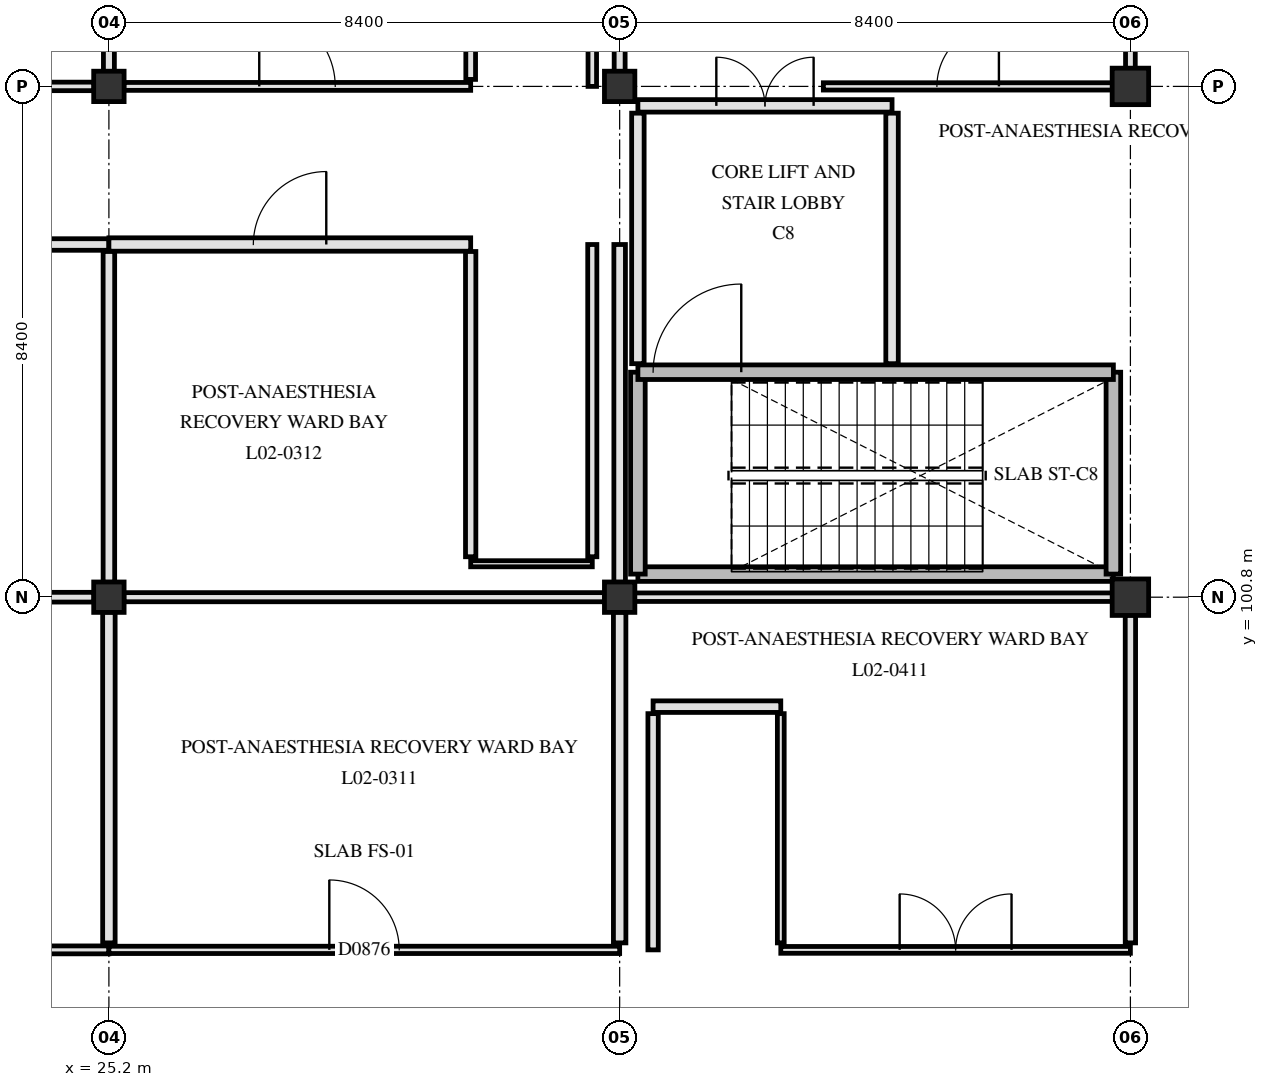
"""IFC4 building model, lengths in metres.
Left out: names, types, materials, properties, quantities, classifications, styles, units other than length and angle.
Written with IfcOpenShell. Run it as: python <this file> out.ifc"""

import sys

from ifc_helpers import new_model, si_unit, direction, frame, frame_2d, origin, origin_2d, place, context, subcontext, project, spatial, rectangle, extrude, element, fill, save


model = new_model("IFC4")
c1 = context("Model", 3, precision=1e-05, world=origin(), true_north=direction((0.0, 1.0)))
c2 = subcontext(c1, "Body", "Model", "MODEL_VIEW")
j1 = project(units=[si_unit("LENGTHUNIT", "METRE"), si_unit("PLANEANGLEUNIT", "RADIAN")], contexts=[c1])
p1 = place(None, origin())
s1 = spatial("IfcSite", under=j1, at=p1, CompositionType="ELEMENT")
p2 = place(p1, origin())
s2 = spatial("IfcBuilding", under=s1, at=p2, CompositionType="ELEMENT")
p3 = place(p2, frame((0.0, 0.0, 9.3)))
s3 = spatial("IfcBuildingStorey", under=s2, at=p3, CompositionType="ELEMENT", Elevation=9.3)
for number, where, z_axis, x_axis in (
    (1, (25.2, 100.8, 0.0), (0.0, 0.0, 1.0), (1.0, 0.0, 0.0)),
    (2, (25.2, 109.2, 0.0), (0.0, 0.0, 1.0), (1.0, 0.0, 0.0)),
    (3, (33.6, 100.8, 0.0), (0.0, 0.0, 1.0), (1.0, 0.0, 0.0)),
    (4, (33.6, 109.2, 0.0), (0.0, 0.0, 1.0), (1.0, 0.0, 0.0)),
):
    element("IfcColumn", number, at=place(p3, frame(where, z_axis=z_axis, x_axis=x_axis)), inside=s3, PredefinedType="COLUMN", context=c2, shape_type="SweptSolid", body=[
        extrude(rectangle(XDim=0.5, YDim=0.5, at=origin_2d()), origin(), (0.0, 0.0, 1.0), 5.1),
    ])
for number, where, z_axis, x_axis in (
    (5, (42.0, 100.8, 0.0), (0.0, 0.0, 1.0), (1.0, 0.0, 0.0)),
    (6, (42.0, 109.2, 0.0), (0.0, 0.0, 1.0), (1.0, 0.0, 0.0)),
):
    element("IfcColumn", number, at=place(p3, frame(where, z_axis=z_axis, x_axis=x_axis)), inside=s3, PredefinedType="COLUMN", context=c2, shape_type="SweptSolid", body=[
        extrude(rectangle(XDim=0.6, YDim=0.6, at=origin_2d()), origin(), (0.0, 0.0, 1.0), 5.1),
    ])
p4 = place(p3, frame((33.9, 101.18, 0.0), z_axis=(0.0, 0.0, 1.0), x_axis=(1.0, 0.0, 0.0)))
e7 = element("IfcWall", 7, at=p4, inside=s3, PredefinedType="SHEAR", context=c2, shape_type="SweptSolid", body=[
    extrude(rectangle(XDim=7.82, YDim=0.24, at=frame_2d((3.91, 0.0))), origin(), (0.0, 0.0, 1.0), 4.78),
])
for number, where, z_axis, x_axis in (
    (8, (33.9, 101.18, 0.0), (0.0, 0.0, 1.0), (0.0, 1.0, 0.0)),
    (9, (41.72, 101.18, 0.0), (0.0, 0.0, 1.0), (0.0, 1.0, 0.0)),
):
    element("IfcWall", number, at=place(p3, frame(where, z_axis=z_axis, x_axis=x_axis)), inside=s3, PredefinedType="SHEAR", context=c2, shape_type="SweptSolid", body=[
        extrude(rectangle(XDim=3.32, YDim=0.24, at=frame_2d((1.66, 0.0))), origin(), (0.0, 0.0, 1.0), 4.78),
    ])
p5 = place(p3, frame((33.9, 104.5, 0.0), z_axis=(0.0, 0.0, 1.0), x_axis=(1.0, 0.0, 0.0)))
e10 = element("IfcWall", 10, at=p5, inside=s3, PredefinedType="SHEAR", context=c2, shape_type="SweptSolid", body=[
    extrude(rectangle(XDim=7.82, YDim=0.24, at=frame_2d((3.91, 0.0))), origin(), (0.0, 0.0, 1.0), 4.78),
])
p6 = place(p5, frame((0.25, 0.0, 0.0)))
e11 = element("IfcOpeningElement", 11, at=p6, cuts=e10, PredefinedType="OPENING", context=c2, shape_type="SweptSolid", body=[
    extrude(rectangle(XDim=1.45, YDim=2.2, at=frame_2d((0.725, 1.1))), frame((0.0, 0.13, 0.0), z_axis=(0.0, -1.0, 0.0), x_axis=(1.0, 0.0, 0.0)), (0.0, 0.0, 1.0), 0.26),
])
p7 = place(p3, frame((38.08, 104.64, 0.0), z_axis=(0.0, 0.0, 1.0), x_axis=(0.0, 1.0, 0.0)))
e12 = element("IfcWall", 12, at=p7, inside=s3, PredefinedType="PARTITIONING", context=c2, shape_type="SweptSolid", body=[
    extrude(rectangle(XDim=4.12, YDim=0.205, at=frame_2d((2.06, 0.0))), origin(), (0.0, 0.0, 1.0), 4.77),
])
p8 = place(p3, frame((33.9, 104.64, 0.0), z_axis=(0.0, 0.0, 1.0), x_axis=(0.0, 1.0, 0.0)))
e13 = element("IfcWall", 13, at=p8, inside=s3, PredefinedType="PARTITIONING", context=c2, shape_type="SweptSolid", body=[
    extrude(rectangle(XDim=4.12, YDim=0.205, at=frame_2d((2.06, 0.0))), origin(), (0.0, 0.0, 1.0), 4.17),
])
p9 = place(p3, frame((33.9, 108.88, 0.0), z_axis=(0.0, 0.0, 1.0), x_axis=(1.0, 0.0, 0.0)))
e14 = element("IfcWall", 14, at=p9, inside=s3, PredefinedType="PARTITIONING", context=c2, shape_type="SweptSolid", body=[
    extrude(rectangle(XDim=4.18, YDim=0.205, at=frame_2d((2.09, 0.0))), origin(), (0.0, 0.0, 1.0), 4.02),
])
p10 = place(p9, frame((1.29, 0.0, 0.0)))
e15 = element("IfcOpeningElement", 15, at=p10, cuts=e14, PredefinedType="OPENING", context=c2, shape_type="SweptSolid", body=[
    extrude(rectangle(XDim=1.6, YDim=2.25, at=frame_2d((0.8, 1.125))), frame((0.0, 0.113, 0.0), z_axis=(0.0, -1.0, 0.0), x_axis=(1.0, 0.0, 0.0)), (0.0, 0.0, 1.0), 0.225),
])
p11 = place(p3, frame((16.8, 95.0, 0.0), z_axis=(0.0, 0.0, 1.0), x_axis=(1.0, 0.0, 0.0)))
e16 = element("IfcWall", 16, at=p11, inside=s3, PredefinedType="PARTITIONING", context=c2, shape_type="SweptSolid", body=[
    extrude(rectangle(XDim=8.4, YDim=0.13, at=frame_2d((4.2, 0.0))), origin(), (0.0, 0.0, 1.0), 4.17),
])
p12 = place(p11, frame((3.4, 0.0, 0.0)))
e17 = element("IfcOpeningElement", 17, at=p12, cuts=e16, PredefinedType="OPENING", context=c2, shape_type="SweptSolid", body=[
    extrude(rectangle(XDim=1.6, YDim=2.25, at=frame_2d((0.8, 1.125))), frame((0.0, 0.075, 0.0), z_axis=(0.0, -1.0, 0.0), x_axis=(1.0, 0.0, 0.0)), (0.0, 0.0, 1.0), 0.15),
])
p13 = place(p3, frame((25.2, 95.0, 0.0), z_axis=(0.0, 0.0, 1.0), x_axis=(1.0, 0.0, 0.0)))
e18 = element("IfcWall", 18, at=p13, inside=s3, PredefinedType="PARTITIONING", context=c2, shape_type="SweptSolid", body=[
    extrude(rectangle(XDim=8.4, YDim=0.12, at=frame_2d((4.2, 0.0))), origin(), (0.0, 0.0, 1.0), 4.17),
])
p14 = place(p13, frame((3.625, 0.0, 0.0)))
e19 = element("IfcOpeningElement", 19, at=p14, cuts=e18, PredefinedType="OPENING", context=c2, shape_type="SweptSolid", body=[
    extrude(rectangle(XDim=1.15, YDim=2.15, at=frame_2d((0.575, 1.075))), frame((0.0, 0.07, 0.0), z_axis=(0.0, -1.0, 0.0), x_axis=(1.0, 0.0, 0.0)), (0.0, 0.0, 1.0), 0.14),
])
p15 = place(p3, frame((36.25, 95.0, 0.0), z_axis=(0.0, 0.0, 1.0), x_axis=(1.0, 0.0, 0.0)))
e20 = element("IfcWall", 20, at=p15, inside=s3, PredefinedType="PARTITIONING", context=c2, shape_type="SweptSolid", body=[
    extrude(rectangle(XDim=5.75, YDim=0.112, at=frame_2d((2.875, 0.0))), origin(), (0.0, 0.0, 1.0), 4.17),
])
p16 = place(p15, frame((1.955, 0.0, 0.0)))
e21 = element("IfcOpeningElement", 21, at=p16, cuts=e20, PredefinedType="OPENING", context=c2, shape_type="SweptSolid", body=[
    extrude(rectangle(XDim=1.84, YDim=2.28, at=frame_2d((0.92, 1.14))), frame((0.0, 0.066, 0.0), z_axis=(0.0, -1.0, 0.0), x_axis=(1.0, 0.0, 0.0)), (0.0, 0.0, 1.0), 0.132),
])
p17 = place(p3, frame((34.15, 99.0, 0.0), z_axis=(0.0, 0.0, 1.0), x_axis=(1.0, 0.0, 0.0)))
e22 = element("IfcWall", 22, at=p17, inside=s3, PredefinedType="PARTITIONING", context=c2, shape_type="SweptSolid", body=[
    extrude(rectangle(XDim=2.1, YDim=0.19, at=frame_2d((1.05, 0.0))), origin(), (0.0, 0.0, 1.0), 4.77),
])
p18 = place(p3, frame((17.045, 100.8, 0.0), z_axis=(0.0, 0.0, 1.0), x_axis=(1.0, 0.0, 0.0)))
e23 = element("IfcWall", 23, at=p18, inside=s3, PredefinedType="PARTITIONING", context=c2, shape_type="SweptSolid", body=[
    extrude(rectangle(XDim=7.91, YDim=0.16, at=frame_2d((3.955, 0.0))), origin(), (0.0, 0.0, 1.0), 4.02),
])
p19 = place(p3, frame((25.445, 100.8, 0.0), z_axis=(0.0, 0.0, 1.0), x_axis=(1.0, 0.0, 0.0)))
e24 = element("IfcWall", 24, at=p19, inside=s3, PredefinedType="PARTITIONING", context=c2, shape_type="SweptSolid", body=[
    extrude(rectangle(XDim=7.91, YDim=0.15, at=frame_2d((3.955, 0.0))), origin(), (0.0, 0.0, 1.0), 4.02),
])
p20 = place(p3, frame((33.845, 100.8, 0.0), z_axis=(0.0, 0.0, 1.0), x_axis=(1.0, 0.0, 0.0)))
e25 = element("IfcWall", 25, at=p20, inside=s3, PredefinedType="PARTITIONING", context=c2, shape_type="SweptSolid", body=[
    extrude(rectangle(XDim=7.86, YDim=0.14, at=frame_2d((3.93, 0.0))), origin(), (0.0, 0.0, 1.0), 4.02),
])
p21 = place(p3, frame((31.15, 101.35, 0.0), z_axis=(0.0, 0.0, 1.0), x_axis=(1.0, 0.0, 0.0)))
e26 = element("IfcWall", 26, at=p21, inside=s3, PredefinedType="PARTITIONING", context=c2, shape_type="SweptSolid", body=[
    extrude(rectangle(XDim=2.0, YDim=0.1, at=frame_2d((1.0, 0.0))), origin(), (0.0, 0.0, 1.0), 4.77),
])
p22 = place(p3, frame((16.8, 106.6, 0.0), z_axis=(0.0, 0.0, 1.0), x_axis=(1.0, 0.0, 0.0)))
e27 = element("IfcWall", 27, at=p22, inside=s3, PredefinedType="PARTITIONING", context=c2, shape_type="SweptSolid", body=[
    extrude(rectangle(XDim=8.4, YDim=0.19, at=frame_2d((4.2, 0.0))), origin(), (0.0, 0.0, 1.0), 4.17),
])
p23 = place(p22, frame((3.25, 0.0, 0.0)))
e28 = element("IfcOpeningElement", 28, at=p23, cuts=e27, PredefinedType="OPENING", context=c2, shape_type="SweptSolid", body=[
    extrude(rectangle(XDim=1.9, YDim=2.3, at=frame_2d((0.95, 1.15))), frame((0.0, 0.105, 0.0), z_axis=(0.0, -1.0, 0.0), x_axis=(1.0, 0.0, 0.0)), (0.0, 0.0, 1.0), 0.21),
])
p24 = place(p3, frame((25.2, 106.6, 0.0), z_axis=(0.0, 0.0, 1.0), x_axis=(1.0, 0.0, 0.0)))
e29 = element("IfcWall", 29, at=p24, inside=s3, PredefinedType="PARTITIONING", context=c2, shape_type="SweptSolid", body=[
    extrude(rectangle(XDim=5.95, YDim=0.22, at=frame_2d((2.975, 0.0))), origin(), (0.0, 0.0, 1.0), 4.17),
])
p25 = place(p24, frame((2.375, 0.0, 0.0)))
e30 = element("IfcOpeningElement", 30, at=p25, cuts=e29, PredefinedType="OPENING", context=c2, shape_type="SweptSolid", body=[
    extrude(rectangle(XDim=1.2, YDim=2.15, at=frame_2d((0.6, 1.075))), frame((0.0, 0.12, 0.0), z_axis=(0.0, -1.0, 0.0), x_axis=(1.0, 0.0, 0.0)), (0.0, 0.0, 1.0), 0.24),
])
p26 = place(p3, frame((17.045, 109.2, 0.0), z_axis=(0.0, 0.0, 1.0), x_axis=(1.0, 0.0, 0.0)))
e31 = element("IfcWall", 31, at=p26, inside=s3, PredefinedType="PARTITIONING", context=c2, shape_type="SweptSolid", body=[
    extrude(rectangle(XDim=7.91, YDim=0.14, at=frame_2d((3.955, 0.0))), origin(), (0.0, 0.0, 1.0), 4.02),
])
p27 = place(p26, frame((3.005, 0.0, 0.0)))
e32 = element("IfcOpeningElement", 32, at=p27, cuts=e31, PredefinedType="OPENING", context=c2, shape_type="SweptSolid", body=[
    extrude(rectangle(XDim=1.9, YDim=2.3, at=frame_2d((0.95, 1.15))), frame((0.0, 0.08, 0.0), z_axis=(0.0, -1.0, 0.0), x_axis=(1.0, 0.0, 0.0)), (0.0, 0.0, 1.0), 0.16),
])
p28 = place(p3, frame((25.445, 109.2, 0.0), z_axis=(0.0, 0.0, 1.0), x_axis=(1.0, 0.0, 0.0)))
e33 = element("IfcWall", 33, at=p28, inside=s3, PredefinedType="PARTITIONING", context=c2, shape_type="SweptSolid", body=[
    extrude(rectangle(XDim=5.705, YDim=0.13, at=frame_2d((2.853, 0.0))), origin(), (0.0, 0.0, 1.0), 4.02),
])
p29 = place(p28, frame((2.228, 0.0, 0.0)))
e34 = element("IfcOpeningElement", 34, at=p29, cuts=e33, PredefinedType="OPENING", context=c2, shape_type="SweptSolid", body=[
    extrude(rectangle(XDim=1.25, YDim=2.2, at=frame_2d((0.625, 1.1))), frame((0.0, 0.075, 0.0), z_axis=(0.0, -1.0, 0.0), x_axis=(1.0, 0.0, 0.0)), (0.0, 0.0, 1.0), 0.15),
])
p30 = place(p3, frame((36.95, 109.2, 0.0), z_axis=(0.0, 0.0, 1.0), x_axis=(1.0, 0.0, 0.0)))
e35 = element("IfcWall", 35, at=p30, inside=s3, PredefinedType="PARTITIONING", context=c2, shape_type="SweptSolid", body=[
    extrude(rectangle(XDim=4.755, YDim=0.12, at=frame_2d((2.377, 0.0))), origin(), (0.0, 0.0, 1.0), 4.02),
])
p31 = place(p30, frame((1.867, 0.0, 0.0)))
e36 = element("IfcOpeningElement", 36, at=p31, cuts=e35, PredefinedType="OPENING", context=c2, shape_type="SweptSolid", body=[
    extrude(rectangle(XDim=1.02, YDim=2.12, at=frame_2d((0.51, 1.06))), frame((0.0, 0.07, 0.0), z_axis=(0.0, -1.0, 0.0), x_axis=(1.0, 0.0, 0.0)), (0.0, 0.0, 1.0), 0.14),
])
p32 = place(p3, frame((25.2, 95.115, 0.0), z_axis=(0.0, 0.0, 1.0), x_axis=(0.0, 1.0, 0.0)))
e37 = element("IfcWall", 37, at=p32, inside=s3, PredefinedType="PARTITIONING", context=c2, shape_type="SweptSolid", body=[
    extrude(rectangle(XDim=5.44, YDim=0.205, at=frame_2d((2.72, 0.0))), origin(), (0.0, 0.0, 1.0), 4.17),
])
p33 = place(p3, frame((25.2, 101.045, 0.0), z_axis=(0.0, 0.0, 1.0), x_axis=(0.0, 1.0, 0.0)))
e38 = element("IfcWall", 38, at=p33, inside=s3, PredefinedType="PARTITIONING", context=c2, shape_type="SweptSolid", body=[
    extrude(rectangle(XDim=5.44, YDim=0.19, at=frame_2d((2.72, 0.0))), origin(), (0.0, 0.0, 1.0), 4.17),
])
p34 = place(p3, frame((25.2, 109.445, 0.0), z_axis=(0.0, 0.0, 1.0), x_axis=(0.0, 1.0, 0.0)))
e39 = element("IfcWall", 39, at=p34, inside=s3, PredefinedType="PARTITIONING", context=c2, shape_type="SweptSolid", body=[
    extrude(rectangle(XDim=7.91, YDim=0.18, at=frame_2d((3.955, 0.0))), origin(), (0.0, 0.0, 1.0), 4.17),
])
p35 = place(p3, frame((31.15, 101.465, 0.0), z_axis=(0.0, 0.0, 1.0), x_axis=(0.0, 1.0, 0.0)))
e40 = element("IfcWall", 40, at=p35, inside=s3, PredefinedType="PARTITIONING", context=c2, shape_type="SweptSolid", body=[
    extrude(rectangle(XDim=5.02, YDim=0.17, at=frame_2d((2.51, 0.0))), origin(), (0.0, 0.0, 1.0), 4.77),
])
p36 = place(p3, frame((31.15, 109.315, 0.0), z_axis=(0.0, 0.0, 1.0), x_axis=(0.0, 1.0, 0.0)))
e41 = element("IfcWall", 41, at=p36, inside=s3, PredefinedType="PARTITIONING", context=c2, shape_type="SweptSolid", body=[
    extrude(rectangle(XDim=2.22, YDim=0.16, at=frame_2d((1.11, 0.0))), origin(), (0.0, 0.0, 1.0), 4.02),
])
p37 = place(p3, frame((33.15, 101.465, 0.0), z_axis=(0.0, 0.0, 1.0), x_axis=(0.0, 1.0, 0.0)))
e42 = element("IfcWall", 42, at=p37, inside=s3, PredefinedType="PARTITIONING", context=c2, shape_type="SweptSolid", body=[
    extrude(rectangle(XDim=5.135, YDim=0.15, at=frame_2d((2.567, 0.0))), origin(), (0.0, 0.0, 1.0), 4.77),
])
p38 = place(p3, frame((33.15, 109.2, 0.0), z_axis=(0.0, 0.0, 1.0), x_axis=(0.0, 1.0, 0.0)))
e43 = element("IfcWall", 43, at=p38, inside=s3, PredefinedType="PARTITIONING", context=c2, shape_type="SweptSolid", body=[
    extrude(rectangle(XDim=2.335, YDim=0.14, at=frame_2d((1.167, 0.0))), origin(), (0.0, 0.0, 1.0), 4.02),
])
p39 = place(p3, frame((33.6, 95.115, 0.0), z_axis=(0.0, 0.0, 1.0), x_axis=(0.0, 1.0, 0.0)))
e44 = element("IfcWall", 44, at=p39, inside=s3, PredefinedType="PARTITIONING", context=c2, shape_type="SweptSolid", body=[
    extrude(rectangle(XDim=5.44, YDim=0.205, at=frame_2d((2.72, 0.0))), origin(), (0.0, 0.0, 1.0), 4.17),
])
p40 = place(p3, frame((33.6, 101.045, 0.0), z_axis=(0.0, 0.0, 1.0), x_axis=(0.0, 1.0, 0.0)))
e45 = element("IfcWall", 45, at=p40, inside=s3, PredefinedType="PARTITIONING", context=c2, shape_type="SweptSolid", body=[
    extrude(rectangle(XDim=5.555, YDim=0.19, at=frame_2d((2.778, 0.0))), origin(), (0.0, 0.0, 1.0), 4.17),
])
p41 = place(p3, frame((33.6, 109.445, 0.0), z_axis=(0.0, 0.0, 1.0), x_axis=(0.0, 1.0, 0.0)))
e46 = element("IfcWall", 46, at=p41, inside=s3, PredefinedType="PARTITIONING", context=c2, shape_type="SweptSolid", body=[
    extrude(rectangle(XDim=7.785, YDim=0.18, at=frame_2d((3.893, 0.0))), origin(), (0.0, 0.0, 1.0), 4.17),
])
p42 = place(p3, frame((34.15, 95.0, 0.0), z_axis=(0.0, 0.0, 1.0), x_axis=(0.0, 1.0, 0.0)))
e47 = element("IfcWall", 47, at=p42, inside=s3, PredefinedType="PARTITIONING", context=c2, shape_type="SweptSolid", body=[
    extrude(rectangle(XDim=3.885, YDim=0.17, at=frame_2d((1.942, 0.0))), origin(), (0.0, 0.0, 1.0), 4.77),
])
p43 = place(p3, frame((36.25, 95.115, 0.0), z_axis=(0.0, 0.0, 1.0), x_axis=(0.0, 1.0, 0.0)))
e48 = element("IfcWall", 48, at=p43, inside=s3, PredefinedType="PARTITIONING", context=c2, shape_type="SweptSolid", body=[
    extrude(rectangle(XDim=3.77, YDim=0.112, at=frame_2d((1.885, 0.0))), origin(), (0.0, 0.0, 1.0), 4.77),
])
p44 = place(p3, frame((42.0, 95.115, 0.0), z_axis=(0.0, 0.0, 1.0), x_axis=(0.0, 1.0, 0.0)))
e49 = element("IfcWall", 49, at=p44, inside=s3, PredefinedType="PARTITIONING", context=c2, shape_type="SweptSolid", body=[
    extrude(rectangle(XDim=5.39, YDim=0.17, at=frame_2d((2.695, 0.0))), origin(), (0.0, 0.0, 1.0), 4.17),
])
p45 = place(p3, frame((42.0, 109.495, 0.0), z_axis=(0.0, 0.0, 1.0), x_axis=(0.0, 1.0, 0.0)))
e50 = element("IfcWall", 50, at=p45, inside=s3, PredefinedType="PARTITIONING", context=c2, shape_type="SweptSolid", body=[
    extrude(rectangle(XDim=7.81, YDim=0.16, at=frame_2d((3.905, 0.0))), origin(), (0.0, 0.0, 1.0), 4.17),
])
p46 = place(p6, origin())
e51 = element("IfcDoor", 51, at=p46, inside=s3, OperationType="SINGLE_SWING_RIGHT", PredefinedType="DOOR", context=c2, shape_type="SweptSolid", body=[
    extrude(rectangle(XDim=1.45, YDim=2.2, at=frame_2d((0.725, 1.1))), frame((0.0, 0.025, 0.0), z_axis=(0.0, -1.0, 0.0), x_axis=(1.0, 0.0, 0.0)), (0.0, 0.0, 1.0), 0.05),
])
fill(e11, e51)
p47 = place(p10, origin())
e52 = element("IfcDoor", 52, at=p47, inside=s3, OperationType="DOUBLE_SWING_LEFT", PredefinedType="DOOR", context=c2, shape_type="SweptSolid", body=[
    extrude(rectangle(XDim=1.6, YDim=2.25, at=frame_2d((0.8, 1.125))), frame((0.0, 0.025, 0.0), z_axis=(0.0, -1.0, 0.0), x_axis=(1.0, 0.0, 0.0)), (0.0, 0.0, 1.0), 0.05),
])
fill(e15, e52)
p48 = place(p14, origin())
e53 = element("IfcDoor", 53, at=p48, inside=s3, OperationType="SINGLE_SWING_LEFT", PredefinedType="DOOR", context=c2, shape_type="SweptSolid", body=[
    extrude(rectangle(XDim=1.15, YDim=2.15, at=frame_2d((0.575, 1.075))), frame((0.0, 0.025, 0.0), z_axis=(0.0, -1.0, 0.0), x_axis=(1.0, 0.0, 0.0)), (0.0, 0.0, 1.0), 0.05),
])
fill(e19, e53)
p49 = place(p25, origin())
e54 = element("IfcDoor", 54, at=p49, inside=s3, OperationType="SINGLE_SWING_RIGHT", PredefinedType="DOOR", context=c2, shape_type="SweptSolid", body=[
    extrude(rectangle(XDim=1.2, YDim=2.15, at=frame_2d((0.6, 1.075))), frame((0.0, 0.025, 0.0), z_axis=(0.0, -1.0, 0.0), x_axis=(1.0, 0.0, 0.0)), (0.0, 0.0, 1.0), 0.05),
])
fill(e30, e54)
p50 = place(p29, origin())
e55 = element("IfcDoor", 55, at=p50, inside=s3, OperationType="SINGLE_SWING_LEFT", PredefinedType="DOOR", context=c2, shape_type="SweptSolid", body=[
    extrude(rectangle(XDim=1.25, YDim=2.2, at=frame_2d((0.625, 1.1))), frame((0.0, 0.025, 0.0), z_axis=(0.0, -1.0, 0.0), x_axis=(1.0, 0.0, 0.0)), (0.0, 0.0, 1.0), 0.05),
])
fill(e34, e55)
p51 = place(p16, origin())
e56 = element("IfcDoor", 56, at=p51, inside=s3, OperationType="DOUBLE_SWING_LEFT", PredefinedType="DOOR", context=c2, shape_type="SweptSolid", body=[
    extrude(rectangle(XDim=1.84, YDim=2.28, at=frame_2d((0.92, 1.14))), frame((0.0, 0.025, 0.0), z_axis=(0.0, -1.0, 0.0), x_axis=(1.0, 0.0, 0.0)), (0.0, 0.0, 1.0), 0.05),
])
fill(e21, e56)
p52 = place(p31, origin())
e57 = element("IfcDoor", 57, at=p52, inside=s3, OperationType="SINGLE_SWING_RIGHT", PredefinedType="DOOR", context=c2, shape_type="SweptSolid", body=[
    extrude(rectangle(XDim=1.02, YDim=2.12, at=frame_2d((0.51, 1.06))), frame((0.0, 0.025, 0.0), z_axis=(0.0, -1.0, 0.0), x_axis=(1.0, 0.0, 0.0)), (0.0, 0.0, 1.0), 0.05),
])
fill(e36, e57)
save(model, sys.argv[1])
